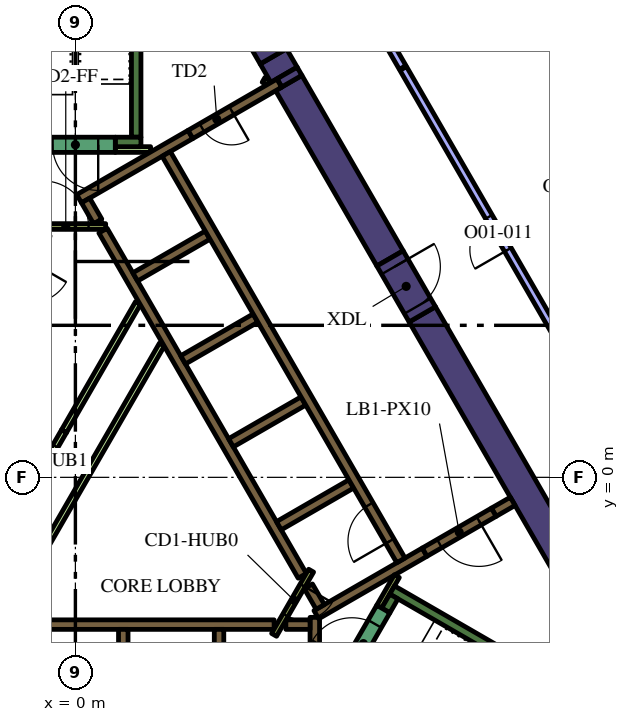
"""IFC4 building model, lengths in metres.
Left out: names, types, materials, properties, quantities, classifications, styles, units other than length and angle.
Written with IfcOpenShell. Run it as: python <this file> out.ifc"""

import sys

from ifc_helpers import new_model, si_unit, direction, frame, frame_2d, origin, place, context, subcontext, project, spatial, polyline, rectangle, outline, extrude, element, fill, save


model = new_model("IFC4")
c1 = context("Model", 3, precision=1e-05, world=origin(), true_north=direction((0.0, 1.0)))
c2 = subcontext(c1, "Body", "Model", "MODEL_VIEW")
j1 = project(units=[si_unit("LENGTHUNIT", "METRE"), si_unit("PLANEANGLEUNIT", "RADIAN")], contexts=[c1])
p1 = place(None, origin())
s1 = spatial("IfcSite", under=j1, at=p1, CompositionType="ELEMENT")
p2 = place(p1, origin())
s2 = spatial("IfcBuilding", under=s1, at=p2, CompositionType="ELEMENT")
p3 = place(p2, frame((0.0, 0.0, 141.6)))
s3 = spatial("IfcBuildingStorey", under=s2, at=p3, CompositionType="ELEMENT", Elevation=141.6)
p4 = place(p3, frame((9.129, 4.289, 0.0), z_axis=(0.0, 0.0, 1.0), x_axis=(0.499995742806, -0.866027861663, 0.0)))
e1 = element("IfcWall", 1, at=p4, inside=s3, PredefinedType="SOLIDWALL", context=c2, shape_type="SweptSolid", body=[
    extrude(rectangle(XDim=12.527, YDim=0.8, at=frame_2d((6.264, 0.0))), origin(), (0.0, 0.0, 1.0), 4.2),
])
p5 = place(p3, frame((5.489, 10.594, 0.0), z_axis=(0.0, 0.0, 1.0), x_axis=(-0.500000383388, 0.866025182435, 0.0)))
e2 = element("IfcWall", 2, at=p5, inside=s3, PredefinedType="SOLIDWALL", context=c2, shape_type="SweptSolid", body=[
    extrude(rectangle(XDim=0.558, YDim=0.8, at=frame_2d((0.279, 0.0))), origin(), (0.0, 0.0, 1.0), 4.2),
])
p6 = place(p3, frame((5.615, 10.375, 0.0), z_axis=(0.0, 0.0, 1.0), x_axis=(0.500002746266, -0.866023818221, 0.0)))
e3 = element("IfcWall", 3, at=p6, inside=s3, PredefinedType="SOLIDWALL", context=c2, shape_type="SweptSolid", body=[
    extrude(rectangle(XDim=5.328, YDim=0.8, at=frame_2d((2.664, 0.0))), origin(), (0.0, 0.0, 1.0), 4.2),
])
p7 = place(p3, origin())
e4 = element("IfcWall", 4, at=p7, inside=s3, PredefinedType="SOLIDWALL", context=c2, shape_type="SweptSolid", body=[
    extrude(outline(polyline([(5.432, 10.272), (5.308, 10.487), (5.836, 10.792), (5.96, 10.577), (5.432, 10.272)])), origin(), (0.0, 0.0, 1.0), 4.2),
])
p8 = place(p3, frame((5.209, 11.078, 0.0), z_axis=(0.0, 0.0, 1.0), x_axis=(-0.500035624827, 0.866004834804, 0.0)))
e5 = element("IfcWall", 5, at=p8, inside=s3, PredefinedType="SOLIDWALL", context=c2, shape_type="SweptSolid", body=[
    extrude(rectangle(XDim=6.388, YDim=0.8, at=frame_2d((3.194, 0.0))), origin(), (0.0, 0.0, 1.0), 4.2),
])
p9 = place(p3, frame((8.334, -2.964, 0.0), z_axis=(0.0, 0.0, 1.0), x_axis=(0.866016039709, -0.500016218704, 0.0)))
e6 = element("IfcWall", 6, at=p9, inside=s3, PredefinedType="SOLIDWALL", context=c2, shape_type="SweptSolid", body=[
    extrude(rectangle(XDim=7.05, YDim=0.25, at=frame_2d((3.525, 0.0))), origin(), (0.0, 0.0, 1.0), 4.2),
])
p10 = place(p3, frame((8.168, -3.503, 0.0), z_axis=(0.0, 0.0, 1.0), x_axis=(0.49972245349, 0.866185586049, 0.0)))
e7 = element("IfcWall", 7, at=p10, inside=s3, PredefinedType="SOLIDWALL", context=c2, shape_type="SweptSolid", body=[
    extrude(rectangle(XDim=0.425, YDim=0.25, at=frame_2d((0.212, 0.0))), origin(), (0.0, 0.0, 1.0), 4.2),
])
p11 = place(p3, frame((1.6, 8.95, 0.0), z_axis=(0.0, 0.0, 1.0), x_axis=(0.0, 1.0, 0.0)))
e8 = element("IfcWall", 8, at=p11, inside=s3, PredefinedType="SOLIDWALL", context=c2, shape_type="SweptSolid", body=[
    extrude(rectangle(XDim=6.8, YDim=0.25, at=frame_2d((3.4, 0.0))), origin(), (0.0, 0.0, 1.0), 4.2),
])
p12 = place(p3, frame((1.05, 8.825, 0.0), z_axis=(0.0, 0.0, 1.0), x_axis=(1.0, 0.0, 0.0)))
e9 = element("IfcWall", 9, at=p12, inside=s3, PredefinedType="SOLIDWALL", context=c2, shape_type="SweptSolid", body=[
    extrude(rectangle(XDim=0.675, YDim=0.25, at=frame_2d((0.337, 0.0))), origin(), (0.0, 0.0, 1.0), 4.2),
])
p13 = place(p3, frame((-5.259, -3.875, 0.0), z_axis=(0.0, 0.0, 1.0), x_axis=(1.0, 0.0, 0.0)))
e10 = element("IfcWall", 10, at=p13, inside=s3, PredefinedType="SOLIDWALL", context=c2, shape_type="SweptSolid", body=[
    extrude(rectangle(XDim=10.489, YDim=0.25, at=frame_2d((5.244, 0.0))), origin(), (0.0, 0.0, 1.0), 4.2),
])
for number, where, z_axis, x_axis in (
    (11, (3.78, -4.0, 0.0), (0.0, 0.0, 1.0), (0.0, -1.0, 0.0)),
    (12, (1.26, -4.0, 0.0), (0.0, 0.0, 1.0), (0.0, -1.0, 0.0)),
):
    element("IfcWall", number, at=place(p3, frame(where, z_axis=z_axis, x_axis=x_axis)), inside=s3, PredefinedType="SOLIDWALL", context=c2, shape_type="SweptSolid", body=[
        extrude(rectangle(XDim=2.2, YDim=0.25, at=frame_2d((1.1, 0.0))), origin(), (0.0, 0.0, 1.0), 4.2),
    ])
p14 = place(p3, frame((6.3, -7.24, 0.0), z_axis=(0.0, 0.0, 1.0), x_axis=(0.0, 1.0, 0.0)))
e13 = element("IfcWall", 13, at=p14, inside=s3, PredefinedType="SOLIDWALL", context=c2, shape_type="SweptSolid", body=[
    extrude(rectangle(XDim=3.556, YDim=0.25, at=frame_2d((1.778, 0.0))), origin(), (0.0, 0.0, 1.0), 4.2),
])
p15 = place(p3, frame((5.538, -3.875, 0.0), z_axis=(0.0, 0.0, 1.0), x_axis=(1.0, 0.0, 0.0)))
e14 = element("IfcWall", 14, at=p15, inside=s3, PredefinedType="SOLIDWALL", context=c2, shape_type="SweptSolid", body=[
    extrude(rectangle(XDim=0.637, YDim=0.25, at=frame_2d((0.318, 0.0))), origin(), (0.0, 0.0, 1.0), 4.2),
])
p16 = place(p3, frame((9.19, -1.969, 0.0), z_axis=(0.0, 0.0, 1.0), x_axis=(-0.866057109641, -0.499945079824, 0.0)))
e15 = element("IfcWall", 15, at=p16, inside=s3, PredefinedType="SOLIDWALL", context=c2, shape_type="SweptSolid", body=[
    extrude(rectangle(XDim=3.291, YDim=0.25, at=frame_2d((1.646, 0.0))), origin(), (0.0, 0.0, 1.0), 4.2),
])
p17 = place(p3, frame((6.13, -2.867, 0.0), z_axis=(0.0, 0.0, 1.0), x_axis=(0.500160776593, -0.865932559475, 0.0)))
e16 = element("IfcWall", 16, at=p17, inside=s3, PredefinedType="SOLIDWALL", context=c2, shape_type="SweptSolid", body=[
    extrude(rectangle(XDim=0.627, YDim=0.25, at=frame_2d((0.313, 0.0))), origin(), (0.0, 0.0, 1.0), 4.2),
])
p18 = place(p3, frame((11.507, -0.631, 0.0), z_axis=(0.0, 0.0, 1.0), x_axis=(-0.866093731455, -0.499881634324, 0.0)))
e17 = element("IfcWall", 17, at=p18, inside=s3, PredefinedType="SOLIDWALL", context=c2, shape_type="SweptSolid", body=[
    extrude(rectangle(XDim=0.575, YDim=0.25, at=frame_2d((0.288, 0.0))), origin(), (0.0, 0.0, 1.0), 4.2),
])
p19 = place(p3, frame((3.028, 9.023, 0.0), z_axis=(0.0, 0.0, 1.0), x_axis=(-0.866036587186, -0.49998062928, 0.0)))
e18 = element("IfcWall", 18, at=p19, inside=s3, PredefinedType="SOLIDWALL", context=c2, shape_type="SweptSolid", body=[
    extrude(rectangle(XDim=3.384, YDim=0.25, at=frame_2d((1.692, 0.0))), origin(), (0.0, 0.0, 1.0), 4.2),
])
p20 = place(p3, frame((0.268, 7.285, 0.0), z_axis=(0.0, 0.0, 1.0), x_axis=(0.500098681536, -0.865968422476, 0.0)))
e19 = element("IfcWall", 19, at=p20, inside=s3, PredefinedType="SOLIDWALL", context=c2, shape_type="SweptSolid", body=[
    extrude(rectangle(XDim=0.636, YDim=0.25, at=frame_2d((0.318, 0.0))), origin(), (0.0, 0.0, 1.0), 4.2),
])
p21 = place(p3, frame((5.97, -2.591, 0.0), z_axis=(0.0, 0.0, 1.0), x_axis=(-0.499994469932, 0.866028596547, 0.0)))
e20 = element("IfcWall", 20, at=p21, inside=s3, PredefinedType="SOLIDWALL", context=c2, shape_type="SweptSolid", body=[
    extrude(rectangle(XDim=10.488, YDim=0.25, at=frame_2d((5.244, 0.0))), origin(), (0.0, 0.0, 1.0), 4.2),
])
p22 = place(p3, frame((1.574, 5.274, 0.0), z_axis=(0.0, 0.0, 1.0), x_axis=(0.866028486751, 0.499994660107, 0.0)))
e21 = element("IfcWall", 21, at=p22, inside=s3, PredefinedType="SOLIDWALL", context=c2, shape_type="SweptSolid", body=[
    extrude(rectangle(XDim=2.2, YDim=0.25, at=frame_2d((1.1, 0.0))), origin(), (0.0, 0.0, 1.0), 4.2),
])
for number, where, z_axis, x_axis in (
    (22, (2.834, 3.091, 0.0), (0.0, 0.0, 1.0), (0.866, 0.5, 0.0)),
    (23, (4.094, 0.909, 0.0), (0.0, 0.0, 1.0), (0.866, 0.5, 0.0)),
    (24, (5.354, -1.274, 0.0), (0.0, 0.0, 1.0), (0.866, 0.5, 0.0)),
):
    element("IfcWall", number, at=place(p3, frame(where, z_axis=z_axis, x_axis=x_axis)), inside=s3, PredefinedType="SOLIDWALL", context=c2, shape_type="SweptSolid", body=[
        extrude(rectangle(XDim=2.2, YDim=0.25, at=frame_2d((1.1, 0.0))), origin(), (0.0, 0.0, 1.0), 4.2),
    ])
p23 = place(p3, frame((1.05, 8.625, 0.0), z_axis=(0.0, 0.0, 1.0), x_axis=(1.0, 0.0, 0.0)))
e25 = element("IfcWall", 25, at=p23, inside=s3, PredefinedType="PARTITIONING", context=c2, shape_type="SweptSolid", body=[
    extrude(rectangle(XDim=0.929, YDim=0.15, at=frame_2d((0.464, 0.0))), origin(), (0.0, 0.0, 1.0), 3.15),
])
p24 = place(p3, frame((4.98, 10.358, 0.0), z_axis=(0.0, 0.0, 1.0), x_axis=(0.500640202437, 0.86565546709, 0.0)))
e26 = element("IfcWall", 26, at=p24, inside=s3, PredefinedType="PARTITIONING", context=c2, shape_type="SweptSolid", body=[
    extrude(rectangle(XDim=0.146, YDim=0.15, at=frame_2d((0.073, 0.0))), origin(), (0.0, 0.0, 1.0), 3.15),
])
p25 = place(p3, frame((8.459, -2.599, 0.0), z_axis=(0.0, 0.0, 1.0), x_axis=(-0.500041054325, -0.866001699761, 0.0)))
e27 = element("IfcWall", 27, at=p25, inside=s3, PredefinedType="PARTITIONING", context=c2, shape_type="SweptSolid", body=[
    extrude(rectangle(XDim=0.929, YDim=0.15, at=frame_2d((0.464, 0.0))), origin(), (0.0, 0.0, 1.0), 4.2),
])
p26 = place(p3, frame((-1.887, -3.718, 0.0), z_axis=(0.0, 0.0, 1.0), x_axis=(0.500005008002, 0.866022512394, 0.0)))
e28 = element("IfcWall", 28, at=p26, inside=s3, PredefinedType="PARTITIONING", context=c2, shape_type="SweptSolid", body=[
    extrude(rectangle(XDim=8.327, YDim=0.15, at=frame_2d((4.164, 0.0))), origin(), (0.0, 0.0, 1.0), 3.15),
])
p27 = place(p3, frame((-0.3, 1.212, 0.0), z_axis=(0.0, 0.0, 1.0), x_axis=(0.499963101113, 0.866046706318, 0.0)))
e29 = element("IfcWall", 29, at=p27, inside=s3, PredefinedType="PARTITIONING", context=c2, shape_type="SweptSolid", body=[
    extrude(rectangle(XDim=3.893, YDim=0.15, at=frame_2d((1.947, 0.0))), origin(), (0.0, 0.0, 1.0), 3.15),
])
p28 = place(p3, frame((8.565, -2.185, 0.0), z_axis=(0.0, 0.0, 1.0), x_axis=(-0.499997954832, 0.866026584559, 0.0)))
e30 = element("IfcWall", 30, at=p28, inside=s3, PredefinedType="SOLIDWALL", context=c2, shape_type="SweptSolid", body=[
    extrude(rectangle(XDim=12.35, YDim=0.25, at=frame_2d((6.175, 0.0))), origin(), (0.0, 0.0, 1.0), 4.2),
])
p29 = place(p28, frame((0.585, 0.0, 0.0)))
e31 = element("IfcOpeningElement", 31, at=p29, cuts=e30, PredefinedType="OPENING", context=c2, shape_type="SweptSolid", body=[
    extrude(rectangle(XDim=1.1, YDim=2.1, at=frame_2d((0.55, 1.05))), frame((0.0, 0.135, 0.0), z_axis=(0.0, -1.0, 0.0), x_axis=(1.0, 0.0, 0.0)), (0.0, 0.0, 1.0), 0.27),
])
p30 = place(p3, frame((7.053, -5.284, 0.0), z_axis=(0.0, 0.0, 1.0), x_axis=(0.500078061341, 0.865980330357, 0.0)))
e32 = element("IfcWall", 32, at=p30, inside=s3, PredefinedType="SOLIDWALL", context=c2, shape_type="SweptSolid", body=[
    extrude(rectangle(XDim=2.1, YDim=0.4, at=frame_2d((1.05, 0.0))), origin(), (0.0, 0.0, 1.0), 4.2),
])
p31 = place(p30, frame((0.45, 0.0, 0.0)))
e33 = element("IfcOpeningElement", 33, at=p31, cuts=e32, PredefinedType="OPENING", context=c2, shape_type="SweptSolid", body=[
    extrude(rectangle(XDim=1.2, YDim=2.1, at=frame_2d((0.6, 1.05))), frame((0.0, 0.21, 0.0), z_axis=(0.0, -1.0, 0.0), x_axis=(1.0, 0.0, 0.0)), (0.0, 0.0, 1.0), 0.42),
])
p32 = place(p3, frame((1.05, 8.75, 0.0), z_axis=(0.0, 0.0, 1.0), x_axis=(-1.0, 0.0, 0.0)))
e34 = element("IfcWall", 34, at=p32, inside=s3, PredefinedType="SOLIDWALL", context=c2, shape_type="SweptSolid", body=[
    extrude(rectangle(XDim=2.1, YDim=0.4, at=frame_2d((1.05, 0.0))), origin(), (0.0, 0.0, 1.0), 4.2),
])
p33 = place(p32, frame((0.45, 0.0, 0.0)))
e35 = element("IfcOpeningElement", 35, at=p33, cuts=e34, PredefinedType="OPENING", context=c2, shape_type="SweptSolid", body=[
    extrude(rectangle(XDim=1.2, YDim=2.1, at=frame_2d((0.6, 1.05))), frame((0.0, 0.21, 0.0), z_axis=(0.0, -1.0, 0.0), x_axis=(1.0, 0.0, 0.0)), (0.0, 0.0, 1.0), 0.42),
])
p34 = place(p3, frame((5.366, 10.373, 0.0), z_axis=(0.0, 0.0, 1.0), x_axis=(-0.866019956843, -0.50000943426, 0.0)))
e36 = element("IfcWall", 36, at=p34, inside=s3, PredefinedType="SOLIDWALL", context=c2, shape_type="SweptSolid", body=[
    extrude(rectangle(XDim=2.7, YDim=0.25, at=frame_2d((1.35, 0.0))), origin(), (0.0, 0.0, 1.0), 4.2),
])
p35 = place(p34, frame((1.45, 0.0, 0.0)))
e37 = element("IfcOpeningElement", 37, at=p35, cuts=e36, PredefinedType="OPENING", context=c2, shape_type="SweptSolid", body=[
    extrude(rectangle(XDim=0.9, YDim=2.1, at=frame_2d((0.45, 1.05))), frame((0.0, 0.135, 0.0), z_axis=(0.0, -1.0, 0.0), x_axis=(1.0, 0.0, 0.0)), (0.0, 0.0, 1.0), 0.27),
])
p36 = place(p3, frame((6.203, -2.456, 0.0), z_axis=(0.0, 0.0, 1.0), x_axis=(-0.500043961785, -0.866000020948, 0.0)))
e38 = element("IfcWall", 38, at=p36, inside=s3, PredefinedType="PARTITIONING", context=c2, shape_type="SweptSolid", body=[
    extrude(rectangle(XDim=1.95, YDim=0.15, at=frame_2d((0.975, 0.0))), origin(), (0.0, 0.0, 1.0), 4.2),
])
p37 = place(p36, frame((0.45, 0.0, 0.0)))
e39 = element("IfcOpeningElement", 39, at=p37, cuts=e38, PredefinedType="OPENING", context=c2, shape_type="SweptSolid", body=[
    extrude(rectangle(XDim=0.9, YDim=2.1, at=frame_2d((0.45, 1.05))), frame((0.0, 0.085, 0.0), z_axis=(0.0, -1.0, 0.0), x_axis=(1.0, 0.0, 0.0)), (0.0, 0.0, 1.0), 0.17),
])
p38 = place(p3, frame((-1.303, 6.6, 0.0), z_axis=(0.0, 0.0, 1.0), x_axis=(1.0, 0.0, 0.0)))
e40 = element("IfcWall", 40, at=p38, inside=s3, PredefinedType="PARTITIONING", context=c2, shape_type="SweptSolid", body=[
    extrude(rectangle(XDim=2.1, YDim=0.15, at=frame_2d((1.05, 0.0))), origin(), (0.0, 0.0, 1.0), 4.2),
])
p39 = place(p38, frame((0.45, 0.0, 0.0)))
e41 = element("IfcOpeningElement", 41, at=p39, cuts=e40, PredefinedType="OPENING", context=c2, shape_type="SweptSolid", body=[
    extrude(rectangle(XDim=1.2, YDim=2.1, at=frame_2d((0.6, 1.05))), frame((0.0, 0.085, 0.0), z_axis=(0.0, -1.0, 0.0), x_axis=(1.0, 0.0, 0.0)), (0.0, 0.0, 1.0), 0.17),
])
p40 = place(p3, frame((11.009, -0.919, 0.0), z_axis=(0.0, 0.0, 1.0), x_axis=(-0.866059744384, -0.49994051562, 0.0)))
e42 = element("IfcWall", 42, at=p40, inside=s3, PredefinedType="SOLIDWALL", context=c2, shape_type="SweptSolid", body=[
    extrude(rectangle(XDim=2.1, YDim=0.25, at=frame_2d((1.05, 0.0))), origin(), (0.0, 0.0, 1.0), 4.2),
])
p41 = place(p40, frame((0.45, 0.0, 0.0)))
e43 = element("IfcOpeningElement", 43, at=p41, cuts=e42, PredefinedType="OPENING", context=c2, shape_type="SweptSolid", body=[
    extrude(rectangle(XDim=1.2, YDim=2.1, at=frame_2d((0.6, 1.05))), frame((0.0, 0.135, 0.0), z_axis=(0.0, -1.0, 0.0), x_axis=(1.0, 0.0, 0.0)), (0.0, 0.0, 1.0), 0.27),
])
p42 = place(p3, frame((8.279, 5.761, 0.0), z_axis=(0.0, 0.0, 1.0), x_axis=(0.500062241894, -0.865989465428, 0.0)))
e44 = element("IfcWall", 44, at=p42, inside=s3, PredefinedType="SOLIDWALL", context=c2, shape_type="SweptSolid", body=[
    extrude(rectangle(XDim=1.7, YDim=0.8, at=frame_2d((0.85, 0.0))), origin(), (0.0, 0.0, 1.0), 4.2),
])
p43 = place(p42, frame((0.25, 0.0, 0.0)))
e45 = element("IfcOpeningElement", 45, at=p43, cuts=e44, PredefinedType="OPENING", context=c2, shape_type="SweptSolid", body=[
    extrude(rectangle(XDim=1.2, YDim=2.1, at=frame_2d((0.6, 1.05))), frame((0.0, 0.41, 0.0), z_axis=(0.0, -1.0, 0.0), x_axis=(1.0, 0.0, 0.0)), (0.0, 0.0, 1.0), 0.82),
])
p44 = place(p3, frame((-1.2, -0.346, 0.0), z_axis=(0.0, 0.0, 1.0), x_axis=(0.499961193289, 0.866047807691, 0.0)))
e46 = element("IfcWall", 46, at=p44, inside=s3, PredefinedType="PARTITIONING", context=c2, shape_type="SweptSolid", body=[
    extrude(rectangle(XDim=1.8, YDim=0.15, at=frame_2d((0.9, 0.0))), origin(), (0.0, 0.0, 1.0), 3.15),
])
p45 = place(p44, frame((0.45, 0.0, 0.0)))
e47 = element("IfcOpeningElement", 47, at=p45, cuts=e46, PredefinedType="OPENING", context=c2, shape_type="SweptSolid", body=[
    extrude(rectangle(XDim=0.9, YDim=2.1, at=frame_2d((0.45, 1.05))), frame((0.0, 0.085, 0.0), z_axis=(0.0, -1.0, 0.0), x_axis=(1.0, 0.0, 0.0)), (0.0, 0.0, 1.0), 0.17),
])
p46 = place(p3, frame((12.951, 11.104, 0.0), z_axis=(0.0, 0.0, 1.0), x_axis=(-0.526204763311, 0.850357893518, 0.0)))
e48 = element("IfcWall", 48, at=p46, inside=s3, PredefinedType="PARTITIONING", context=c2, shape_type="SweptSolid", body=[
    extrude(rectangle(XDim=3.197, YDim=0.15, at=frame_2d((1.599, 0.0))), origin(), (0.0, 0.0, 1.0), 3.15),
])
p47 = place(p3, frame((13.63, 2.091, 0.0), z_axis=(0.0, 0.0, 1.0), x_axis=(-0.499990634175, 0.866030811078, 0.0)))
e49 = element("IfcWall", 49, at=p47, inside=s3, PredefinedType="PARTITIONING", context=c2, shape_type="SweptSolid", body=[
    extrude(rectangle(XDim=10.008, YDim=0.2, at=frame_2d((5.004, 0.0))), origin(), (0.0, 0.0, 1.0), 3.15),
])
p48 = place(p47, frame((4.5, 0.0, 0.0)))
e50 = element("IfcOpeningElement", 50, at=p48, cuts=e49, PredefinedType="OPENING", context=c2, shape_type="SweptSolid", body=[
    extrude(rectangle(XDim=1.0, YDim=2.1, at=frame_2d((0.5, 1.05))), frame((0.0, 0.11, 0.0), z_axis=(0.0, -1.0, 0.0), x_axis=(1.0, 0.0, 0.0)), (0.0, 0.0, 1.0), 0.22),
])
p49 = place(p3, frame((8.611, 10.785, 0.0), z_axis=(0.0, 0.0, 1.0), x_axis=(-0.499987928593, 0.866032373102, 0.0)))
e51 = element("IfcWall", 51, at=p49, inside=s3, PredefinedType="PARTITIONING", context=c2, shape_type="SweptSolid", body=[
    extrude(rectangle(XDim=8.889, YDim=0.2, at=frame_2d((4.445, 0.0))), origin(), (0.0, 0.0, 1.0), 3.15),
])
p50 = place(p29, origin())
e52 = element("IfcDoor", 52, at=p50, inside=s3, OperationType="DOUBLE_DOOR_SLIDING", PredefinedType="DOOR", context=c2, shape_type="SweptSolid", body=[
    extrude(rectangle(XDim=1.1, YDim=2.1, at=frame_2d((0.55, 1.05))), frame((0.0, 0.025, 0.0), z_axis=(0.0, -1.0, 0.0), x_axis=(1.0, 0.0, 0.0)), (0.0, 0.0, 1.0), 0.05),
])
fill(e31, e52)
p51 = place(p31, origin())
e53 = element("IfcDoor", 53, at=p51, inside=s3, OperationType="SINGLE_SWING_LEFT", PredefinedType="DOOR", context=c2, shape_type="SweptSolid", body=[
    extrude(rectangle(XDim=1.2, YDim=2.1, at=frame_2d((0.6, 1.05))), frame((0.0, 0.025, 0.0), z_axis=(0.0, -1.0, 0.0), x_axis=(1.0, 0.0, 0.0)), (0.0, 0.0, 1.0), 0.05),
])
fill(e33, e53)
p52 = place(p33, origin())
e54 = element("IfcDoor", 54, at=p52, inside=s3, OperationType="SINGLE_SWING_LEFT", PredefinedType="DOOR", context=c2, shape_type="SweptSolid", body=[
    extrude(rectangle(XDim=1.2, YDim=2.1, at=frame_2d((0.6, 1.05))), frame((0.0, 0.025, 0.0), z_axis=(0.0, -1.0, 0.0), x_axis=(1.0, 0.0, 0.0)), (0.0, 0.0, 1.0), 0.05),
])
fill(e35, e54)
p53 = place(p35, origin())
e55 = element("IfcDoor", 55, at=p53, inside=s3, OperationType="SINGLE_SWING_LEFT", PredefinedType="DOOR", context=c2, shape_type="SweptSolid", body=[
    extrude(rectangle(XDim=0.9, YDim=2.1, at=frame_2d((0.45, 1.05))), frame((0.0, 0.025, 0.0), z_axis=(0.0, -1.0, 0.0), x_axis=(1.0, 0.0, 0.0)), (0.0, 0.0, 1.0), 0.05),
])
fill(e37, e55)
p54 = place(p37, origin())
e56 = element("IfcDoor", 56, at=p54, inside=s3, OperationType="SINGLE_SWING_LEFT", PredefinedType="DOOR", context=c2, shape_type="SweptSolid", body=[
    extrude(rectangle(XDim=0.9, YDim=2.1, at=frame_2d((0.45, 1.05))), frame((0.0, 0.025, 0.0), z_axis=(0.0, -1.0, 0.0), x_axis=(1.0, 0.0, 0.0)), (0.0, 0.0, 1.0), 0.05),
])
fill(e39, e56)
p55 = place(p39, origin())
e57 = element("IfcDoor", 57, at=p55, inside=s3, OperationType="SINGLE_SWING_LEFT", PredefinedType="DOOR", context=c2, shape_type="SweptSolid", body=[
    extrude(rectangle(XDim=1.2, YDim=2.1, at=frame_2d((0.6, 1.05))), frame((0.0, 0.025, 0.0), z_axis=(0.0, -1.0, 0.0), x_axis=(1.0, 0.0, 0.0)), (0.0, 0.0, 1.0), 0.05),
])
fill(e41, e57)
p56 = place(p41, origin())
e58 = element("IfcDoor", 58, at=p56, inside=s3, OperationType="SINGLE_SWING_LEFT", PredefinedType="DOOR", context=c2, shape_type="SweptSolid", body=[
    extrude(rectangle(XDim=1.2, YDim=2.1, at=frame_2d((0.6, 1.05))), frame((0.0, 0.025, 0.0), z_axis=(0.0, -1.0, 0.0), x_axis=(1.0, 0.0, 0.0)), (0.0, 0.0, 1.0), 0.05),
])
fill(e43, e58)
p57 = place(p43, origin())
e59 = element("IfcDoor", 59, at=p57, inside=s3, OperationType="SINGLE_SWING_LEFT", PredefinedType="DOOR", context=c2, shape_type="SweptSolid", body=[
    extrude(rectangle(XDim=1.2, YDim=2.1, at=frame_2d((0.6, 1.05))), frame((0.0, 0.025, 0.0), z_axis=(0.0, -1.0, 0.0), x_axis=(1.0, 0.0, 0.0)), (0.0, 0.0, 1.0), 0.05),
])
fill(e45, e59)
p58 = place(p45, origin())
e60 = element("IfcDoor", 60, at=p58, inside=s3, OperationType="SINGLE_SWING_LEFT", PredefinedType="DOOR", context=c2, shape_type="SweptSolid", body=[
    extrude(rectangle(XDim=0.9, YDim=2.1, at=frame_2d((0.45, 1.05))), frame((0.0, 0.025, 0.0), z_axis=(0.0, -1.0, 0.0), x_axis=(1.0, 0.0, 0.0)), (0.0, 0.0, 1.0), 0.05),
])
fill(e47, e60)
p59 = place(p48, origin())
e61 = element("IfcDoor", 61, at=p59, inside=s3, OperationType="SINGLE_SWING_LEFT", PredefinedType="DOOR", context=c2, shape_type="SweptSolid", body=[
    extrude(rectangle(XDim=1.0, YDim=2.1, at=frame_2d((0.5, 1.05))), frame((0.0, 0.025, 0.0), z_axis=(0.0, -1.0, 0.0), x_axis=(1.0, 0.0, 0.0)), (0.0, 0.0, 1.0), 0.05),
])
fill(e50, e61)
save(model, sys.argv[1])
